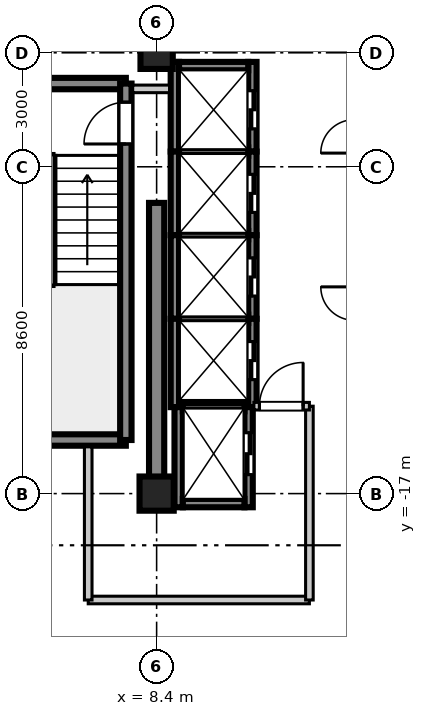
"""IFC4 building model, lengths in metres.
Left out: names, types, materials, properties, quantities, classifications, styles, units other than length and angle.
Written with IfcOpenShell. Run it as: python <this file> out.ifc"""

import sys

from ifc_helpers import new_model, si_unit, direction, frame, frame_2d, origin, origin_2d, place, context, subcontext, project, spatial, rectangle, extrude, source, transform, mapped, element, fill, save


model = new_model("IFC4")
c1 = context("Model", 3, precision=1e-05, world=origin(), true_north=direction((0.0, 1.0)))
c2 = subcontext(c1, "Body", "Model", "MODEL_VIEW")
j1 = project(units=[si_unit("LENGTHUNIT", "METRE"), si_unit("PLANEANGLEUNIT", "RADIAN")], contexts=[c1])
p1 = place(None, origin())
s1 = spatial("IfcSite", under=j1, at=p1, CompositionType="ELEMENT")
p2 = place(p1, origin())
s2 = spatial("IfcBuilding", under=s1, at=p2, CompositionType="ELEMENT")
p3 = place(p2, frame((0.0, 0.0, 304.2)))
s3 = spatial("IfcBuildingStorey", under=s2, at=p3, CompositionType="ELEMENT", Elevation=304.2)
m1 = source(origin(), c2, "Body", "SweptSolid", [
    extrude(rectangle(XDim=0.9, YDim=0.9, at=origin_2d()), origin(), (0.0, 0.0, 1.0), 3.805),
])
p4 = place(p3, frame((8.4, -17.0, 0.0), z_axis=(0.0, 0.0, 1.0), x_axis=(1.0, 0.0, 0.0)))
e1 = element("IfcColumn", 1, at=p4, inside=s3, PredefinedType="COLUMN", context=c2, shape_type="MappedRepresentation", body=[
    mapped(m1, transform((0.0, 0.0, 0.0), scale=1.0)),
])
m2 = source(origin(), c2, "Body", "SweptSolid", [
    extrude(rectangle(XDim=0.85, YDim=0.85, at=origin_2d()), origin(), (0.0, 0.0, 1.0), 3.805),
])
p5 = place(p3, frame((8.4, -5.4, 0.0), z_axis=(0.0, 0.0, 1.0), x_axis=(1.0, 0.0, 0.0)))
e2 = element("IfcColumn", 2, at=p5, inside=s3, PredefinedType="PILASTER", context=c2, shape_type="MappedRepresentation", body=[
    mapped(m2, transform((0.0, 0.0, 0.0), scale=1.0)),
])
m3 = source(origin(), c2, "Body", "SweptSolid", [
    extrude(rectangle(XDim=7.65, YDim=0.4, at=frame_2d((3.825, 0.0))), origin(), (0.0, 0.0, 1.0), 3.55),
])
p6 = place(p3, frame((8.4, -17.0, 0.0), z_axis=(0.0, 0.0, 1.0), x_axis=(0.0, 1.0, 0.0)))
e3 = element("IfcWall", 3, at=p6, inside=s3, PredefinedType="SHEAR", context=c2, shape_type="MappedRepresentation", body=[
    mapped(m3, transform((0.0, 0.0, 0.0), scale=1.0)),
])
m4 = source(origin(), c2, "Body", "SweptSolid", [
    extrude(rectangle(XDim=3.98, YDim=0.3, at=frame_2d((1.99, 0.0))), origin(), (0.0, 0.0, 1.0), 3.55),
])
for number, where, z_axis, x_axis in (
    (4, (3.61, -15.59, 0.0), (0.0, 0.0, 1.0), (1.0, 0.0, 0.0)),
    (5, (3.61, -6.21, 0.0), (0.0, 0.0, 1.0), (1.0, 0.0, 0.0)),
):
    element("IfcWall", number, at=place(p3, frame(where, z_axis=z_axis, x_axis=x_axis)), inside=s3, PredefinedType="SHEAR", context=c2, shape_type="MappedRepresentation", body=[
        mapped(m4, transform((0.0, 0.0, 0.0), scale=1.0)),
    ])
m5 = source(origin(), c2, "Body", "SweptSolid", [
    extrude(rectangle(XDim=9.38, YDim=0.3, at=frame_2d((4.69, 0.0))), origin(), (0.0, 0.0, 1.0), 3.55),
])
p7 = place(p3, frame((7.59, -15.59, 0.0), z_axis=(0.0, 0.0, 1.0), x_axis=(0.0, 1.0, 0.0)))
e6 = element("IfcWall", 6, at=p7, inside=s3, PredefinedType="SHEAR", context=c2, shape_type="MappedRepresentation", body=[
    mapped(m5, transform((0.0, 0.0, 0.0), scale=1.0)),
])
p8 = place(p7, frame((7.79, 0.0, 0.0)))
e7 = element("IfcOpeningElement", 7, at=p8, cuts=e6, PredefinedType="OPENING", context=c2, shape_type="SweptSolid", body=[
    extrude(rectangle(XDim=1.1, YDim=2.15, at=frame_2d((0.55, 1.075))), frame((0.0, 0.16, 0.0), z_axis=(0.0, -1.0, 0.0), x_axis=(1.0, 0.0, 0.0)), (0.0, 0.0, 1.0), 0.32),
])
m6 = source(origin(), c2, "Body", "SweptSolid", [
    extrude(rectangle(XDim=2.36, YDim=0.22, at=frame_2d((1.18, 0.0))), origin(), (0.0, 0.0, 1.0), 3.55),
])
p9 = place(p3, frame((8.88, -8.0, 0.0), z_axis=(0.0, 0.0, 1.0), x_axis=(0.0, 1.0, 0.0)))
e8 = element("IfcWall", 8, at=p9, inside=s3, PredefinedType="SHEAR", context=c2, shape_type="MappedRepresentation", body=[
    mapped(m6, transform((0.0, 0.0, 0.0), scale=1.0)),
])
p10 = place(p3, frame((10.92, -8.0, 0.0), z_axis=(0.0, 0.0, 1.0), x_axis=(0.0, 1.0, 0.0)))
e9 = element("IfcWall", 9, at=p10, inside=s3, PredefinedType="SHEAR", context=c2, shape_type="MappedRepresentation", body=[
    mapped(m6, transform((0.0, 0.0, 0.0), scale=1.0)),
])
p11 = place(p10, frame((0.6, 0.0, 0.0)))
e10 = element("IfcOpeningElement", 10, at=p11, cuts=e9, PredefinedType="OPENING", context=c2, shape_type="SweptSolid", body=[
    extrude(rectangle(XDim=1.0, YDim=2.2, at=frame_2d((0.5, 1.1))), frame((0.0, 0.12, 0.0), z_axis=(0.0, -1.0, 0.0), x_axis=(1.0, 0.0, 0.0)), (0.0, 0.0, 1.0), 0.24),
])
m7 = source(origin(), c2, "Body", "SweptSolid", [
    extrude(rectangle(XDim=1.82, YDim=0.22, at=frame_2d((0.91, 0.0))), origin(), (0.0, 0.0, 1.0), 3.55),
])
p12 = place(p3, frame((8.99, -5.75, 0.0), z_axis=(0.0, 0.0, 1.0), x_axis=(1.0, 0.0, 0.0)))
e11 = element("IfcWall", 11, at=p12, inside=s3, PredefinedType="SHEAR", context=c2, shape_type="MappedRepresentation", body=[
    mapped(m7, transform((0.0, 0.0, 0.0), scale=1.0)),
])
m8 = source(origin(), c2, "Body", "SweptSolid", [
    extrude(rectangle(XDim=2.2, YDim=0.22, at=frame_2d((1.1, 0.0))), origin(), (0.0, 0.0, 1.0), 3.55),
])
p13 = place(p3, frame((8.88, -10.2, 0.0), z_axis=(0.0, 0.0, 1.0), x_axis=(0.0, 1.0, 0.0)))
e12 = element("IfcWall", 12, at=p13, inside=s3, PredefinedType="SHEAR", context=c2, shape_type="MappedRepresentation", body=[
    mapped(m8, transform((0.0, 0.0, 0.0), scale=1.0)),
])
p14 = place(p3, frame((10.92, -10.2, 0.0), z_axis=(0.0, 0.0, 1.0), x_axis=(0.0, 1.0, 0.0)))
e13 = element("IfcWall", 13, at=p14, inside=s3, PredefinedType="SHEAR", context=c2, shape_type="MappedRepresentation", body=[
    mapped(m8, transform((0.0, 0.0, 0.0), scale=1.0)),
])
p15 = place(p14, frame((0.6, 0.0, 0.0)))
e14 = element("IfcOpeningElement", 14, at=p15, cuts=e13, PredefinedType="OPENING", context=c2, shape_type="SweptSolid", body=[
    extrude(rectangle(XDim=1.0, YDim=2.2, at=frame_2d((0.5, 1.1))), frame((0.0, 0.12, 0.0), z_axis=(0.0, -1.0, 0.0), x_axis=(1.0, 0.0, 0.0)), (0.0, 0.0, 1.0), 0.24),
])
m9 = source(origin(), c2, "Body", "SweptSolid", [
    extrude(rectangle(XDim=1.82, YDim=0.22, at=frame_2d((0.91, 0.0))), origin(), (0.0, 0.0, 1.0), 3.85),
])
p16 = place(p3, frame((8.99, -8.0, 0.0), z_axis=(0.0, 0.0, 1.0), x_axis=(1.0, 0.0, 0.0)))
e15 = element("IfcWall", 15, at=p16, inside=s3, PredefinedType="SHEAR", context=c2, shape_type="MappedRepresentation", body=[
    mapped(m9, transform((0.0, 0.0, 0.0), scale=1.0)),
])
p17 = place(p3, frame((8.88, -12.4, 0.0), z_axis=(0.0, 0.0, 1.0), x_axis=(0.0, 1.0, 0.0)))
e16 = element("IfcWall", 16, at=p17, inside=s3, PredefinedType="SHEAR", context=c2, shape_type="MappedRepresentation", body=[
    mapped(m8, transform((0.0, 0.0, 0.0), scale=1.0)),
])
p18 = place(p3, frame((10.92, -12.4, 0.0), z_axis=(0.0, 0.0, 1.0), x_axis=(0.0, 1.0, 0.0)))
e17 = element("IfcWall", 17, at=p18, inside=s3, PredefinedType="SHEAR", context=c2, shape_type="MappedRepresentation", body=[
    mapped(m8, transform((0.0, 0.0, 0.0), scale=1.0)),
])
p19 = place(p18, frame((0.6, 0.0, 0.0)))
e18 = element("IfcOpeningElement", 18, at=p19, cuts=e17, PredefinedType="OPENING", context=c2, shape_type="SweptSolid", body=[
    extrude(rectangle(XDim=1.0, YDim=2.2, at=frame_2d((0.5, 1.1))), frame((0.0, 0.12, 0.0), z_axis=(0.0, -1.0, 0.0), x_axis=(1.0, 0.0, 0.0)), (0.0, 0.0, 1.0), 0.24),
])
p20 = place(p3, frame((8.99, -10.2, 0.0), z_axis=(0.0, 0.0, 1.0), x_axis=(1.0, 0.0, 0.0)))
e19 = element("IfcWall", 19, at=p20, inside=s3, PredefinedType="SHEAR", context=c2, shape_type="MappedRepresentation", body=[
    mapped(m9, transform((0.0, 0.0, 0.0), scale=1.0)),
])
m10 = source(origin(), c2, "Body", "SweptSolid", [
    extrude(rectangle(XDim=2.325, YDim=0.22, at=frame_2d((1.163, 0.0))), origin(), (0.0, 0.0, 1.0), 3.55),
])
p21 = place(p3, frame((8.88, -14.725, 0.0), z_axis=(0.0, 0.0, 1.0), x_axis=(0.0, 1.0, 0.0)))
e20 = element("IfcWall", 20, at=p21, inside=s3, PredefinedType="SHEAR", context=c2, shape_type="MappedRepresentation", body=[
    mapped(m10, transform((0.0, 0.0, 0.0), scale=1.0)),
])
p22 = place(p3, frame((10.92, -14.725, 0.0), z_axis=(0.0, 0.0, 1.0), x_axis=(0.0, 1.0, 0.0)))
e21 = element("IfcWall", 21, at=p22, inside=s3, PredefinedType="SHEAR", context=c2, shape_type="MappedRepresentation", body=[
    mapped(m10, transform((0.0, 0.0, 0.0), scale=1.0)),
])
p23 = place(p22, frame((0.725, 0.0, 0.0)))
e22 = element("IfcOpeningElement", 22, at=p23, cuts=e21, PredefinedType="OPENING", context=c2, shape_type="SweptSolid", body=[
    extrude(rectangle(XDim=1.0, YDim=2.2, at=frame_2d((0.5, 1.1))), frame((0.0, 0.12, 0.0), z_axis=(0.0, -1.0, 0.0), x_axis=(1.0, 0.0, 0.0)), (0.0, 0.0, 1.0), 0.24),
])
p24 = place(p3, frame((8.99, -12.4, 0.0), z_axis=(0.0, 0.0, 1.0), x_axis=(1.0, 0.0, 0.0)))
e23 = element("IfcWall", 23, at=p24, inside=s3, PredefinedType="SHEAR", context=c2, shape_type="MappedRepresentation", body=[
    mapped(m9, transform((0.0, 0.0, 0.0), scale=1.0)),
])
m11 = source(origin(), c2, "Body", "SweptSolid", [
    extrude(rectangle(XDim=2.635, YDim=0.22, at=frame_2d((1.317, 0.0))), origin(), (0.0, 0.0, 1.0), 3.55),
])
p25 = place(p3, frame((8.98, -17.36, 0.0), z_axis=(0.0, 0.0, 1.0), x_axis=(0.0, 1.0, 0.0)))
e24 = element("IfcWall", 24, at=p25, inside=s3, PredefinedType="SHEAR", context=c2, shape_type="MappedRepresentation", body=[
    mapped(m11, transform((0.0, 0.0, 0.0), scale=1.0)),
])
p26 = place(p3, frame((10.82, -17.36, 0.0), z_axis=(0.0, 0.0, 1.0), x_axis=(0.0, 1.0, 0.0)))
e25 = element("IfcWall", 25, at=p26, inside=s3, PredefinedType="SHEAR", context=c2, shape_type="MappedRepresentation", body=[
    mapped(m11, transform((0.0, 0.0, 0.0), scale=1.0)),
])
p27 = place(p26, frame((0.86, 0.0, 0.0)))
e26 = element("IfcOpeningElement", 26, at=p27, cuts=e25, PredefinedType="OPENING", context=c2, shape_type="SweptSolid", body=[
    extrude(rectangle(XDim=1.1, YDim=2.2, at=frame_2d((0.55, 1.1))), frame((0.0, 0.12, 0.0), z_axis=(0.0, -1.0, 0.0), x_axis=(1.0, 0.0, 0.0)), (0.0, 0.0, 1.0), 0.24),
])
m12 = source(origin(), c2, "Body", "SweptSolid", [
    extrude(rectangle(XDim=1.62, YDim=0.22, at=frame_2d((0.81, 0.0))), origin(), (0.0, 0.0, 1.0), 3.55),
])
p28 = place(p3, frame((9.09, -17.25, 0.0), z_axis=(0.0, 0.0, 1.0), x_axis=(1.0, 0.0, 0.0)))
e27 = element("IfcWall", 27, at=p28, inside=s3, PredefinedType="SHEAR", context=c2, shape_type="MappedRepresentation", body=[
    mapped(m12, transform((0.0, 0.0, 0.0), scale=1.0)),
])
m13 = source(origin(), c2, "Body", "SweptSolid", [
    extrude(rectangle(XDim=1.62, YDim=0.22, at=frame_2d((0.81, 0.0))), origin(), (0.0, 0.0, 1.0), 3.85),
])
p29 = place(p3, frame((9.09, -14.725, 0.0), z_axis=(0.0, 0.0, 1.0), x_axis=(1.0, 0.0, 0.0)))
e28 = element("IfcWall", 28, at=p29, inside=s3, PredefinedType="SHEAR", context=c2, shape_type="MappedRepresentation", body=[
    mapped(m13, transform((0.0, 0.0, 0.0), scale=1.0)),
])
m14 = source(origin(), c2, "Body", "SweptSolid", [
    extrude(rectangle(XDim=5.82, YDim=0.2, at=frame_2d((2.91, 0.0))), origin(), (0.0, 0.0, 1.0), 2.89),
])
p30 = place(p3, frame((6.6, -19.8, 0.0), z_axis=(0.0, 0.0, 1.0), x_axis=(1.0, 0.0, 0.0)))
e29 = element("IfcWall", 29, at=p30, inside=s3, PredefinedType="PARTITIONING", context=c2, shape_type="MappedRepresentation", body=[
    mapped(m14, transform((0.0, 0.0, 0.0), scale=1.0)),
])
m15 = source(origin(), c2, "Body", "SweptSolid", [
    extrude(rectangle(XDim=4.03, YDim=0.2, at=frame_2d((2.015, 0.0))), origin(), (0.0, 0.0, 1.0), 2.89),
])
p31 = place(p3, frame((6.6, -19.8, 0.0), z_axis=(0.0, 0.0, 1.0), x_axis=(0.0, 1.0, 0.0)))
e30 = element("IfcWall", 30, at=p31, inside=s3, PredefinedType="PARTITIONING", context=c2, shape_type="MappedRepresentation", body=[
    mapped(m15, transform((0.0, 0.0, 0.0), scale=1.0)),
])
m16 = source(origin(), c2, "Body", "SweptSolid", [
    extrude(rectangle(XDim=5.1, YDim=0.2, at=frame_2d((2.55, 0.0))), origin(), (0.0, 0.0, 1.0), 2.89),
])
p32 = place(p3, frame((12.42, -19.8, 0.0), z_axis=(0.0, 0.0, 1.0), x_axis=(0.0, 1.0, 0.0)))
e31 = element("IfcWall", 31, at=p32, inside=s3, PredefinedType="PARTITIONING", context=c2, shape_type="MappedRepresentation", body=[
    mapped(m16, transform((0.0, 0.0, 0.0), scale=1.0)),
])
m17 = source(origin(), c2, "Body", "SweptSolid", [
    extrude(rectangle(XDim=1.46, YDim=0.2, at=frame_2d((0.73, 0.0))), origin(), (0.0, 0.0, 1.0), 2.89),
])
p33 = place(p3, frame((10.96, -14.7, 0.0), z_axis=(0.0, 0.0, 1.0), x_axis=(1.0, 0.0, 0.0)))
e32 = element("IfcWall", 32, at=p33, inside=s3, PredefinedType="PARTITIONING", context=c2, shape_type="MappedRepresentation", body=[
    mapped(m17, transform((0.0, 0.0, 0.0), scale=1.0)),
])
p34 = place(p33, frame((0.145, 0.0, 0.0)))
e33 = element("IfcOpeningElement", 33, at=p34, cuts=e32, PredefinedType="OPENING", context=c2, shape_type="SweptSolid", body=[
    extrude(rectangle(XDim=1.15, YDim=2.15, at=frame_2d((0.575, 1.075))), frame((0.0, 0.11, 0.0), z_axis=(0.0, -1.0, 0.0), x_axis=(1.0, 0.0, 0.0)), (0.0, 0.0, 1.0), 0.22),
])
m18 = source(origin(), c2, "Body", "SweptSolid", [
    extrude(rectangle(XDim=0.97, YDim=0.2, at=frame_2d((0.485, 0.0))), origin(), (0.0, 0.0, 1.0), 2.89),
])
p35 = place(p3, frame((7.77, -6.35, 0.0), z_axis=(0.0, 0.0, 1.0), x_axis=(1.0, 0.0, 0.0)))
e34 = element("IfcWall", 34, at=p35, inside=s3, PredefinedType="PARTITIONING", context=c2, shape_type="MappedRepresentation", body=[
    mapped(m18, transform((0.0, 0.0, 0.0), scale=1.0)),
])
m19 = source(origin(), c2, "Body", "SweptSolid", [
    extrude(rectangle(XDim=1.1, YDim=2.15, at=frame_2d((0.55, 1.075))), frame((0.0, 0.025, 0.0), z_axis=(0.0, -1.0, 0.0), x_axis=(1.0, 0.0, 0.0)), (0.0, 0.0, 1.0), 0.05),
])
p36 = place(p8, origin())
e35 = element("IfcDoor", 35, at=p36, inside=s3, OperationType="SINGLE_SWING_LEFT", PredefinedType="DOOR", context=c2, shape_type="MappedRepresentation", body=[
    mapped(m19, transform((0.0, 0.0, 0.0), scale=1.0)),
])
fill(e7, e35)
m20 = source(origin(), c2, "Body", "SweptSolid", [
    extrude(rectangle(XDim=1.0, YDim=2.2, at=frame_2d((0.5, 1.1))), frame((0.0, 0.025, 0.0), z_axis=(0.0, -1.0, 0.0), x_axis=(1.0, 0.0, 0.0)), (0.0, 0.0, 1.0), 0.05),
])
p37 = place(p11, frame((1.0, 0.0, 0.0), z_axis=(0.0, 0.0, 1.0), x_axis=(-1.0, 0.0, 0.0)))
e36 = element("IfcDoor", 36, at=p37, inside=s3, OperationType="DOUBLE_DOOR_SLIDING", PredefinedType="DOOR", context=c2, shape_type="MappedRepresentation", body=[
    mapped(m20, transform((0.0, 0.0, 0.0), scale=1.0)),
])
fill(e10, e36)
p38 = place(p15, frame((1.0, 0.0, 0.0), z_axis=(0.0, 0.0, 1.0), x_axis=(-1.0, 0.0, 0.0)))
e37 = element("IfcDoor", 37, at=p38, inside=s3, OperationType="DOUBLE_DOOR_SLIDING", PredefinedType="DOOR", context=c2, shape_type="MappedRepresentation", body=[
    mapped(m20, transform((0.0, 0.0, 0.0), scale=1.0)),
])
fill(e14, e37)
p39 = place(p19, frame((1.0, 0.0, 0.0), z_axis=(0.0, 0.0, 1.0), x_axis=(-1.0, 0.0, 0.0)))
e38 = element("IfcDoor", 38, at=p39, inside=s3, OperationType="DOUBLE_DOOR_SLIDING", PredefinedType="DOOR", context=c2, shape_type="MappedRepresentation", body=[
    mapped(m20, transform((0.0, 0.0, 0.0), scale=1.0)),
])
fill(e18, e38)
p40 = place(p23, frame((1.0, 0.0, 0.0), z_axis=(0.0, 0.0, 1.0), x_axis=(-1.0, 0.0, 0.0)))
e39 = element("IfcDoor", 39, at=p40, inside=s3, OperationType="DOUBLE_DOOR_SLIDING", PredefinedType="DOOR", context=c2, shape_type="MappedRepresentation", body=[
    mapped(m20, transform((0.0, 0.0, 0.0), scale=1.0)),
])
fill(e22, e39)
m21 = source(origin(), c2, "Body", "SweptSolid", [
    extrude(rectangle(XDim=1.1, YDim=2.2, at=frame_2d((0.55, 1.1))), frame((0.0, 0.025, 0.0), z_axis=(0.0, -1.0, 0.0), x_axis=(1.0, 0.0, 0.0)), (0.0, 0.0, 1.0), 0.05),
])
p41 = place(p27, frame((1.1, 0.0, 0.0), z_axis=(0.0, 0.0, 1.0), x_axis=(-1.0, 0.0, 0.0)))
e40 = element("IfcDoor", 40, at=p41, inside=s3, OperationType="DOUBLE_DOOR_SLIDING", PredefinedType="DOOR", context=c2, shape_type="MappedRepresentation", body=[
    mapped(m21, transform((0.0, 0.0, 0.0), scale=1.0)),
])
fill(e26, e40)
m22 = source(origin(), c2, "Body", "SweptSolid", [
    extrude(rectangle(XDim=1.15, YDim=2.15, at=frame_2d((0.575, 1.075))), frame((0.0, 0.025, 0.0), z_axis=(0.0, -1.0, 0.0), x_axis=(1.0, 0.0, 0.0)), (0.0, 0.0, 1.0), 0.05),
])
p42 = place(p34, origin())
e41 = element("IfcDoor", 41, at=p42, inside=s3, OperationType="SINGLE_SWING_RIGHT", PredefinedType="DOOR", context=c2, shape_type="MappedRepresentation", body=[
    mapped(m22, transform((0.0, 0.0, 0.0), scale=1.0)),
])
fill(e33, e41)
save(model, sys.argv[1])
